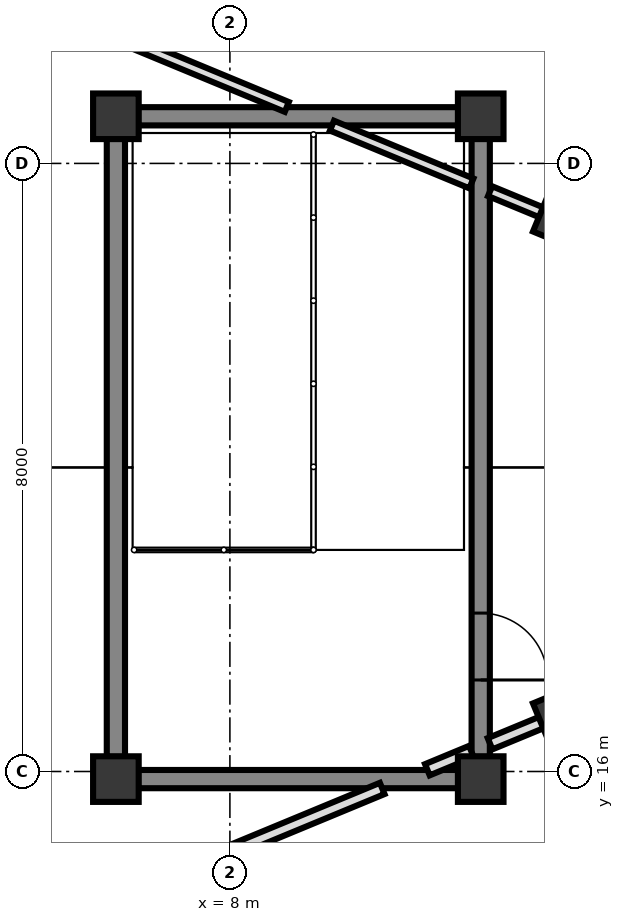
"""IFC4 building model, lengths in metres.
Left out: names, types, materials, properties, quantities, classifications, styles, units other than length and angle.
Written with IfcOpenShell. Run it as: python <this file> out.ifc"""

import sys

from ifc_helpers import new_model, si_unit, direction, frame, frame_2d, origin, origin_2d, place, context, subcontext, project, spatial, rectangle, extrude, element, fill, save


model = new_model("IFC4")
c1 = context("Model", 3, precision=1e-05, world=origin(), true_north=direction((0.0, 1.0)))
c2 = subcontext(c1, "Body", "Model", "MODEL_VIEW")
j1 = project(units=[si_unit("LENGTHUNIT", "METRE"), si_unit("PLANEANGLEUNIT", "RADIAN")], contexts=[c1])
p1 = place(None, origin())
s1 = spatial("IfcSite", under=j1, at=p1, CompositionType="ELEMENT")
p2 = place(p1, origin())
s2 = spatial("IfcBuilding", under=s1, at=p2, CompositionType="ELEMENT")
p3 = place(p2, frame((0.0, 0.0, 12.5)))
s3 = spatial("IfcBuildingStorey", under=s2, at=p3, CompositionType="ELEMENT", Elevation=12.5)
for number, where, z_axis, x_axis in (
    (1, (6.5, 15.9, 0.0), (0.0, 0.0, 1.0), (1.0, 0.0, 0.0)),
    (2, (11.3, 15.9, 0.0), (0.0, 0.0, 1.0), (1.0, 0.0, 0.0)),
    (3, (11.3, 24.62, 0.0), (0.0, 0.0, 1.0), (1.0, 0.0, 0.0)),
    (4, (6.5, 24.62, 0.0), (0.0, 0.0, 1.0), (1.0, 0.0, 0.0)),
):
    element("IfcColumn", number, at=place(p3, frame(where, z_axis=z_axis, x_axis=x_axis)), inside=s3, PredefinedType="COLUMN", context=c2, shape_type="SweptSolid", body=[
        extrude(rectangle(XDim=0.6, YDim=0.6, at=origin_2d()), origin(), (0.0, 0.0, 1.0), 4.0),
    ])
for number, where, z_axis, x_axis in (
    (5, (12.347, 23.253, 0.0), (0.0, 0.0, 1.0), (-0.924, 0.383, 0.0)),
    (6, (12.347, 16.747, 0.0), (0.0, 0.0, 1.0), (-0.924, -0.383, 0.0)),
):
    element("IfcColumn", number, at=place(p3, frame(where, z_axis=z_axis, x_axis=x_axis)), inside=s3, PredefinedType="COLUMN", context=c2, shape_type="SweptSolid", body=[
        extrude(rectangle(XDim=0.55, YDim=0.55, at=origin_2d()), origin(), (0.0, 0.0, 1.0), 4.59),
    ])
p4 = place(p3, frame((6.5, 16.192, 0.0), z_axis=(0.0, 0.0, 1.0), x_axis=(0.0, 1.0, 0.0)))
e7 = element("IfcWall", 7, at=p4, inside=s3, PredefinedType="SHEAR", context=c2, shape_type="SweptSolid", body=[
    extrude(rectangle(XDim=8.136, YDim=0.24, at=frame_2d((4.068, 0.0))), origin(), (0.0, 0.0, 1.0), 3.74),
])
p5 = place(p3, frame((11.3, 24.328, 0.0), z_axis=(0.0, 0.0, 1.0), x_axis=(0.0, -1.0, 0.0)))
e8 = element("IfcWall", 8, at=p5, inside=s3, PredefinedType="SHEAR", context=c2, shape_type="SweptSolid", body=[
    extrude(rectangle(XDim=8.136, YDim=0.24, at=frame_2d((4.068, 0.0))), origin(), (0.0, 0.0, 1.0), 3.74),
])
p6 = place(p5, frame((6.244, 0.0, 0.0)))
e9 = element("IfcOpeningElement", 9, at=p6, cuts=e8, PredefinedType="OPENING", context=c2, shape_type="SweptSolid", body=[
    extrude(rectangle(XDim=0.88, YDim=2.1, at=frame_2d((0.44, 1.05))), frame((0.0, 0.13, 0.0), z_axis=(0.0, -1.0, 0.0), x_axis=(1.0, 0.0, 0.0)), (0.0, 0.0, 1.0), 0.26),
])
for number, where, z_axis, x_axis in (
    (10, (11.008, 15.9, 0.0), (0.0, 0.0, 1.0), (-1.0, 0.0, 0.0)),
    (11, (11.008, 24.62, 0.0), (0.0, 0.0, 1.0), (-1.0, 0.0, 0.0)),
):
    element("IfcWall", number, at=place(p3, frame(where, z_axis=z_axis, x_axis=x_axis)), inside=s3, PredefinedType="SHEAR", context=c2, shape_type="SweptSolid", body=[
        extrude(rectangle(XDim=4.216, YDim=0.24, at=frame_2d((2.108, 0.0))), origin(), (0.0, 0.0, 1.0), 3.74),
    ])
p7 = place(p3, frame((12.1, 23.355, 0.0), z_axis=(0.0, 0.0, 1.0), x_axis=(-0.924069600435, 0.382224245113, 0.0)))
e12 = element("IfcWall", 12, at=p7, inside=s3, PredefinedType="PARTITIONING", context=c2, shape_type="SweptSolid", body=[
    extrude(rectangle(XDim=0.733, YDim=0.14, at=frame_2d((0.366, 0.0))), origin(), (0.0, 0.0, 1.0), 3.7),
])
p8 = place(p3, frame((11.177, 23.737, 0.0), z_axis=(0.0, 0.0, 1.0), x_axis=(-0.923817443679, 0.382833293686, 0.0)))
e13 = element("IfcWall", 13, at=p8, inside=s3, PredefinedType="PARTITIONING", context=c2, shape_type="SweptSolid", body=[
    extrude(rectangle(XDim=1.985, YDim=0.14, at=frame_2d((0.993, 0.0))), origin(), (0.0, 0.0, 1.0), 3.7),
])
p9 = place(p3, frame((8.749, 24.743, 0.0), z_axis=(0.0, 0.0, 1.0), x_axis=(-0.923877739946, 0.382687759972, 0.0)))
e14 = element("IfcWall", 14, at=p9, inside=s3, PredefinedType="PARTITIONING", context=c2, shape_type="SweptSolid", body=[
    extrude(rectangle(XDim=4.813, YDim=0.14, at=frame_2d((2.407, 0.0))), origin(), (0.0, 0.0, 1.0), 3.7),
])
p10 = place(p3, frame((12.1, 16.645, 0.0), z_axis=(0.0, 0.0, 1.0), x_axis=(-0.924069600435, -0.382224245113, 0.0)))
e15 = element("IfcWall", 15, at=p10, inside=s3, PredefinedType="PARTITIONING", context=c2, shape_type="SweptSolid", body=[
    extrude(rectangle(XDim=0.733, YDim=0.16, at=frame_2d((0.366, 0.0))), origin(), (0.0, 0.0, 1.0), 3.7),
])
p11 = place(p3, frame((11.177, 16.263, 0.0), z_axis=(0.0, 0.0, 1.0), x_axis=(-0.923812676193, -0.382844797933, 0.0)))
e16 = element("IfcWall", 16, at=p11, inside=s3, PredefinedType="PARTITIONING", context=c2, shape_type="SweptSolid", body=[
    extrude(rectangle(XDim=0.627, YDim=0.16, at=frame_2d((0.313, 0.0))), origin(), (0.0, 0.0, 1.0), 3.7),
])
p12 = place(p3, frame((10.004, 15.777, 0.0), z_axis=(0.0, 0.0, 1.0), x_axis=(-0.923864955254, -0.382718623082, 0.0)))
e17 = element("IfcWall", 17, at=p12, inside=s3, PredefinedType="PARTITIONING", context=c2, shape_type="SweptSolid", body=[
    extrude(rectangle(XDim=6.172, YDim=0.16, at=frame_2d((3.086, 0.0))), origin(), (0.0, 0.0, 1.0), 3.7),
])
p13 = place(p6, origin())
e18 = element("IfcDoor", 18, at=p13, inside=s3, OperationType="SINGLE_SWING_RIGHT", PredefinedType="DOOR", context=c2, shape_type="SweptSolid", body=[
    extrude(rectangle(XDim=0.88, YDim=2.1, at=frame_2d((0.44, 1.05))), frame((0.0, 0.025, 0.0), z_axis=(0.0, -1.0, 0.0), x_axis=(1.0, 0.0, 0.0)), (0.0, 0.0, 1.0), 0.05),
])
fill(e9, e18)
save(model, sys.argv[1])
